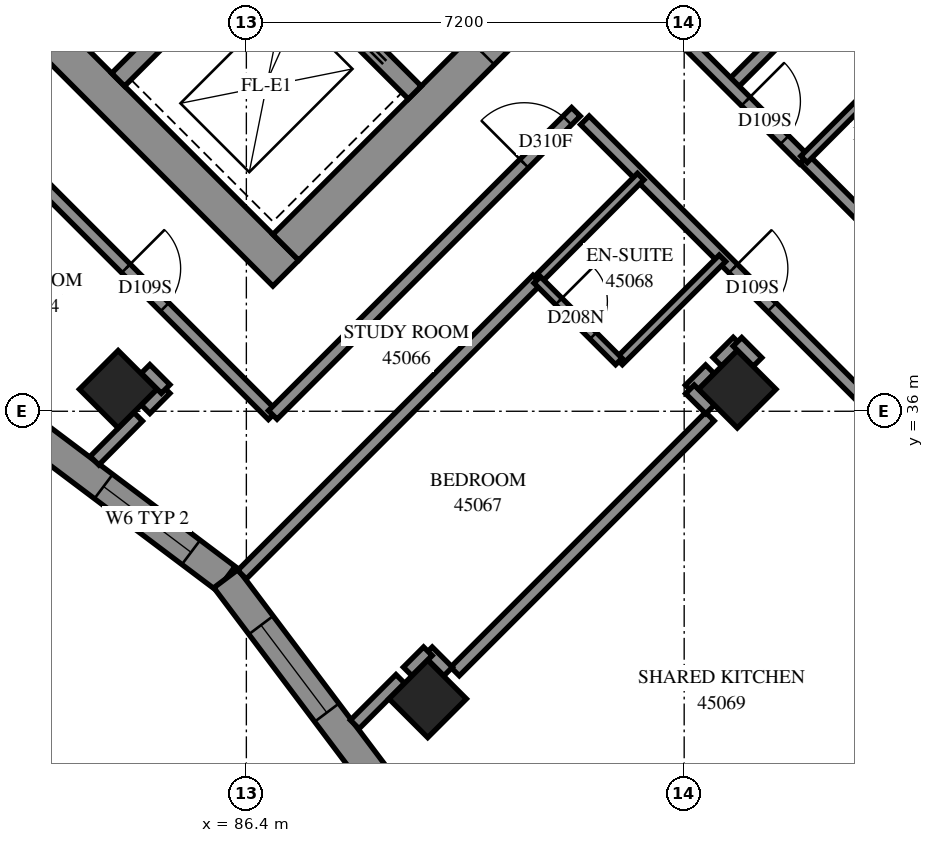
"""IFC4 building model, lengths in metres.
Left out: names, types, materials, properties, quantities, classifications, styles, units other than length and angle.
Written with IfcOpenShell. Run it as: python <this file> out.ifc"""

import sys

from ifc_helpers import new_model, si_unit, direction, frame, frame_2d, origin, origin_2d, place, context, subcontext, project, spatial, polyline, rectangle, outline, extrude, element, fill, save


model = new_model("IFC4")
c1 = context("Model", 3, precision=1e-05, world=origin(), true_north=direction((0.0, 1.0)))
c2 = subcontext(c1, "Body", "Model", "MODEL_VIEW")
j1 = project(units=[si_unit("LENGTHUNIT", "METRE"), si_unit("PLANEANGLEUNIT", "RADIAN")], contexts=[c1])
p1 = place(None, origin())
s1 = spatial("IfcSite", under=j1, at=p1, CompositionType="ELEMENT")
p2 = place(p1, origin())
s2 = spatial("IfcBuilding", under=s1, at=p2, CompositionType="ELEMENT")
p3 = place(p2, frame((0.0, 0.0, 166.0)))
s3 = spatial("IfcBuildingStorey", under=s2, at=p3, CompositionType="ELEMENT", Elevation=166.0)
for number, where, z_axis, x_axis in (
    (1, (84.291, 36.362, 0.0), (0.0, 0.0, 1.0), (0.707, -0.707, 0.0)),
    (2, (94.474, 36.362, 0.0), (0.0, 0.0, 1.0), (0.707, -0.707, 0.0)),
    (3, (89.382, 31.271, 0.0), (0.0, 0.0, 1.0), (0.707, -0.707, 0.0)),
):
    element("IfcColumn", number, at=place(p3, frame(where, z_axis=z_axis, x_axis=x_axis)), inside=s3, PredefinedType="COLUMN", context=c2, shape_type="SweptSolid", body=[
        extrude(rectangle(XDim=0.9, YDim=0.9, at=origin_2d()), origin(), (0.0, 0.0, 1.0), 3.1),
    ])
p4 = place(p3, frame((76.018, 49.302, -0.3), z_axis=(0.0, 0.0, 1.0), x_axis=(0.7071067812, -0.7071067812, 0.0)))
e4 = element("IfcWall", 4, at=p4, inside=s3, PredefinedType="SHEAR", context=c2, shape_type="SweptSolid", body=[
    extrude(rectangle(XDim=15.6, YDim=0.6, at=frame_2d((7.8, 0.0))), origin(), (0.0, 0.0, 1.0), 2.7),
])
p5 = place(p3, frame((87.049, 38.695, -0.3), z_axis=(0.0, 0.0, 1.0), x_axis=(0.7071067812, 0.7071067812, 0.0)))
e5 = element("IfcWall", 5, at=p5, inside=s3, PredefinedType="SHEAR", context=c2, shape_type="SweptSolid", body=[
    extrude(rectangle(XDim=14.4, YDim=0.6, at=frame_2d((7.2, 0.0))), origin(), (0.0, 0.0, 1.0), 2.7),
])
p6 = place(p5, frame((4.55, 0.0, 0.3)))
e6 = element("IfcOpeningElement", 6, at=p6, cuts=e5, PredefinedType="OPENING", context=c2, shape_type="SweptSolid", body=[
    extrude(rectangle(XDim=1.1, YDim=2.1, at=frame_2d((0.55, 1.05))), frame((0.0, 0.31, 0.0), z_axis=(0.0, -1.0, 0.0), x_axis=(1.0, 0.0, 0.0)), (0.0, 0.0, 1.0), 0.62),
])
p7 = place(p5, frame((11.35, 0.0, 0.3)))
e7 = element("IfcOpeningElement", 7, at=p7, cuts=e5, PredefinedType="OPENING", context=c2, shape_type="SweptSolid", body=[
    extrude(rectangle(XDim=1.1, YDim=2.1, at=frame_2d((0.55, 1.05))), frame((0.0, 0.31, 0.0), z_axis=(0.0, -1.0, 0.0), x_axis=(1.0, 0.0, 0.0)), (0.0, 0.0, 1.0), 0.62),
])
p8 = place(p3, frame((84.291, 41.453, 0.0), z_axis=(0.0, 0.0, 1.0), x_axis=(0.7071067812, 0.7071067812, 0.0)))
e8 = element("IfcWall", 8, at=p8, inside=s3, PredefinedType="SOLIDWALL", context=c2, shape_type="SweptSolid", body=[
    extrude(rectangle(XDim=3.3, YDim=0.3, at=frame_2d((1.65, 0.0))), origin(), (0.0, 0.0, 1.0), 3.1),
])
p9 = place(p3, frame((78.988, 51.423, 0.0), z_axis=(0.0, 0.0, 1.0), x_axis=(0.7071067812, -0.7071067812, 0.0)))
e9 = element("IfcWall", 9, at=p9, inside=s3, PredefinedType="SOLIDWALL", context=c2, shape_type="SweptSolid", body=[
    extrude(rectangle(XDim=14.4, YDim=0.3, at=frame_2d((7.2, 0.0))), origin(), (0.0, 0.0, 1.0), 3.1),
])
p10 = place(p9, frame((1.35, 0.0, 0.0)))
e10 = element("IfcOpeningElement", 10, at=p10, cuts=e9, PredefinedType="OPENING", context=c2, shape_type="SweptSolid", body=[
    extrude(rectangle(XDim=0.9, YDim=2.1, at=frame_2d((0.45, 1.05))), frame((0.0, 0.16, 0.0), z_axis=(0.0, -1.0, 0.0), x_axis=(1.0, 0.0, 0.0)), (0.0, 0.0, 1.0), 0.32),
])
p11 = place(p9, frame((4.95, 0.0, 0.0)))
e11 = element("IfcOpeningElement", 11, at=p11, cuts=e9, PredefinedType="OPENING", context=c2, shape_type="SweptSolid", body=[
    extrude(rectangle(XDim=0.9, YDim=2.1, at=frame_2d((0.45, 1.05))), frame((0.0, 0.16, 0.0), z_axis=(0.0, -1.0, 0.0), x_axis=(1.0, 0.0, 0.0)), (0.0, 0.0, 1.0), 0.32),
])
p12 = place(p9, frame((8.55, 0.0, 0.0)))
e12 = element("IfcOpeningElement", 12, at=p12, cuts=e9, PredefinedType="OPENING", context=c2, shape_type="SweptSolid", body=[
    extrude(rectangle(XDim=0.9, YDim=2.1, at=frame_2d((0.45, 1.05))), frame((0.0, 0.16, 0.0), z_axis=(0.0, -1.0, 0.0), x_axis=(1.0, 0.0, 0.0)), (0.0, 0.0, 1.0), 0.32),
])
p13 = place(p9, frame((12.05, 0.0, 0.0)))
e13 = element("IfcOpeningElement", 13, at=p13, cuts=e9, PredefinedType="OPENING", context=c2, shape_type="SweptSolid", body=[
    extrude(rectangle(XDim=1.1, YDim=2.1, at=frame_2d((0.55, 1.05))), frame((0.0, 0.16, 0.0), z_axis=(0.0, -1.0, 0.0), x_axis=(1.0, 0.0, 0.0)), (0.0, 0.0, 1.0), 0.32),
])
p14 = place(p3, frame((82.798, 35.706, 0.0), z_axis=(0.0, 0.0, 1.0), x_axis=(0.7990920997, -0.6012086295, 0.0)))
e14 = element("IfcWall", 14, at=p14, inside=s3, PredefinedType="SOLIDWALL", context=c2, shape_type="SweptSolid", body=[
    extrude(outline(polyline([(-0.035, -0.25), (4.053, -0.25), (4.124, 0.25), (0.035, 0.25), (-0.035, -0.25)])), origin(), (0.0, 0.0, 1.0), 3.1),
])
p15 = place(p14, frame((1.569, 0.0, 0.7)))
e15 = element("IfcOpeningElement", 15, at=p15, cuts=e14, PredefinedType="OPENING", context=c2, shape_type="SweptSolid", body=[
    extrude(rectangle(XDim=1.8, YDim=2.2, at=frame_2d((0.9, 1.1))), frame((0.0, 0.26, 0.0), z_axis=(0.0, -1.0, 0.0), x_axis=(1.0, 0.0, 0.0)), (0.0, 0.0, 1.0), 0.52),
])
p16 = place(p3, frame((86.065, 33.248, 0.0), z_axis=(0.0, 0.0, 1.0), x_axis=(0.6012086295, -0.7990920997, 0.0)))
e16 = element("IfcWall", 16, at=p16, inside=s3, PredefinedType="SOLIDWALL", context=c2, shape_type="SweptSolid", body=[
    extrude(outline(polyline([(0.035, -0.25), (4.124, -0.25), (4.053, 0.25), (-0.035, 0.25), (0.035, -0.25)])), origin(), (0.0, 0.0, 1.0), 3.1),
])
p17 = place(p16, frame((0.958, 0.0, 0.7)))
e17 = element("IfcOpeningElement", 17, at=p17, cuts=e16, PredefinedType="OPENING", context=c2, shape_type="SweptSolid", body=[
    extrude(rectangle(XDim=1.8, YDim=2.2, at=frame_2d((0.9, 1.1))), frame((0.0, 0.26, 0.0), z_axis=(0.0, -1.0, 0.0), x_axis=(1.0, 0.0, 0.0)), (0.0, 0.0, 1.0), 0.52),
])
p18 = place(p3, frame((91.967, 40.785, 0.0), z_axis=(0.0, 0.0, 1.0), x_axis=(0.7071067812, -0.7071067812, 0.0)))
e18 = element("IfcWall", 18, at=p18, inside=s3, PredefinedType="PARTITIONING", context=c2, shape_type="SweptSolid", body=[
    extrude(rectangle(XDim=12.1, YDim=0.2, at=frame_2d((6.05, 0.0))), origin(), (0.0, 0.0, 1.0), 3.1),
])
p19 = place(p18, frame((3.448, 0.0, 0.0)))
e19 = element("IfcOpeningElement", 19, at=p19, cuts=e18, PredefinedType="OPENING", context=c2, shape_type="SweptSolid", body=[
    extrude(rectangle(XDim=0.9, YDim=2.1, at=frame_2d((0.45, 1.05))), frame((0.0, 0.11, 0.0), z_axis=(0.0, -1.0, 0.0), x_axis=(1.0, 0.0, 0.0)), (0.0, 0.0, 1.0), 0.22),
])
p20 = place(p18, frame((8.457, 0.0, 0.0)))
e20 = element("IfcOpeningElement", 20, at=p20, cuts=e18, PredefinedType="OPENING", context=c2, shape_type="SweptSolid", body=[
    extrude(rectangle(XDim=1.0, YDim=2.1, at=frame_2d((0.5, 1.05))), frame((0.0, 0.11, 0.0), z_axis=(0.0, -1.0, 0.0), x_axis=(1.0, 0.0, 0.0)), (0.0, 0.0, 1.0), 0.22),
])
p21 = place(p3, frame((94.366, 41.348, 0.0), z_axis=(0.0, 0.0, 1.0), x_axis=(0.7071108994, 0.707102663, 0.0)))
e21 = element("IfcWall", 21, at=p21, inside=s3, PredefinedType="PARTITIONING", context=c2, shape_type="SweptSolid", body=[
    extrude(rectangle(XDim=12.141, YDim=0.2, at=frame_2d((6.071, 0.0))), origin(), (0.0, 0.0, 1.0), 3.1),
])
p22 = place(p3, frame((80.899, 41.869, 0.0), z_axis=(0.0, 0.0, 1.0), x_axis=(0.7071067812, -0.7071067812, 0.0)))
e22 = element("IfcWall", 22, at=p22, inside=s3, PredefinedType="PARTITIONING", context=c2, shape_type="SweptSolid", body=[
    extrude(rectangle(XDim=8.392, YDim=0.2, at=frame_2d((4.196, 0.0))), origin(), (0.0, 0.0, 1.0), 3.1),
])
p23 = place(p22, frame((4.979, 0.0, 0.0)))
e23 = element("IfcOpeningElement", 23, at=p23, cuts=e22, PredefinedType="OPENING", context=c2, shape_type="SweptSolid", body=[
    extrude(rectangle(XDim=0.9, YDim=2.1, at=frame_2d((0.45, 1.05))), frame((0.0, 0.11, 0.0), z_axis=(0.0, -1.0, 0.0), x_axis=(1.0, 0.0, 0.0)), (0.0, 0.0, 1.0), 0.22),
])
p24 = place(p3, frame((86.834, 35.94, 0.0), z_axis=(0.0, 0.0, 1.0), x_axis=(0.7072486139, 0.7069649201, 0.0)))
e24 = element("IfcWall", 24, at=p24, inside=s3, PredefinedType="PARTITIONING", context=c2, shape_type="SweptSolid", body=[
    extrude(rectangle(XDim=7.05, YDim=0.2, at=frame_2d((3.525, 0.0))), origin(), (0.0, 0.0, 1.0), 3.1),
])
p25 = place(p24, frame((5.848, 0.0, 0.0)))
e25 = element("IfcOpeningElement", 25, at=p25, cuts=e24, PredefinedType="OPENING", context=c2, shape_type="SweptSolid", body=[
    extrude(rectangle(XDim=1.0, YDim=2.1, at=frame_2d((0.5, 1.05))), frame((0.0, 0.11, 0.0), z_axis=(0.0, -1.0, 0.0), x_axis=(1.0, 0.0, 0.0)), (0.0, 0.0, 1.0), 0.22),
])
p26 = place(p3, frame((86.329, 33.313, 0.0), z_axis=(0.0, 0.0, 1.0), x_axis=(0.7072524412, 0.7069610911, 0.0)))
e26 = element("IfcWall", 26, at=p26, inside=s3, PredefinedType="PARTITIONING", context=c2, shape_type="SweptSolid", body=[
    extrude(rectangle(XDim=6.865, YDim=0.2, at=frame_2d((3.432, 0.0))), origin(), (0.0, 0.0, 1.0), 3.1),
])
p27 = place(p3, frame((89.831, 31.721, 0.0), z_axis=(0.0, 0.0, 1.0), x_axis=(0.7071067812, 0.7071067812, 0.0)))
e27 = element("IfcWall", 27, at=p27, inside=s3, PredefinedType="PARTITIONING", context=c2, shape_type="SweptSolid", body=[
    extrude(rectangle(XDim=5.928, YDim=0.2, at=frame_2d((2.964, 0.0))), origin(), (0.0, 0.0, 1.0), 3.1),
])
p28 = place(p3, frame((94.923, 26.631, 0.0), z_axis=(0.0, 0.0, 1.0), x_axis=(0.7071067812, 0.7071067812, 0.0)))
e28 = element("IfcWall", 28, at=p28, inside=s3, PredefinedType="PARTITIONING", context=c2, shape_type="SweptSolid", body=[
    extrude(rectangle(XDim=5.926, YDim=0.2, at=frame_2d((2.963, 0.0))), origin(), (0.0, 0.0, 1.0), 2.6),
])
p29 = place(p3, frame((95.573, 40.148, 0.0), z_axis=(0.0, 0.0, 1.0), x_axis=(0.7068698107, -0.7073436723, 0.0)))
e29 = element("IfcWall", 29, at=p29, inside=s3, PredefinedType="PARTITIONING", context=c2, shape_type="SweptSolid", body=[
    extrude(rectangle(XDim=3.799, YDim=0.2, at=frame_2d((1.899, 0.0))), origin(), (0.0, 0.0, 1.0), 3.1),
])
p30 = place(p3, frame((93.305, 42.403, 0.0), z_axis=(0.0, 0.0, 1.0), x_axis=(0.7071067812, -0.7071067812, 0.0)))
e30 = element("IfcWall", 30, at=p30, inside=s3, PredefinedType="PARTITIONING", context=c2, shape_type="SweptSolid", body=[
    extrude(rectangle(XDim=3.199, YDim=0.2, at=frame_2d((1.599, 0.0))), origin(), (0.0, 0.0, 1.0), 3.1),
])
p31 = place(p30, frame((1.848, 0.0, 0.0)))
e31 = element("IfcOpeningElement", 31, at=p31, cuts=e30, PredefinedType="OPENING", context=c2, shape_type="SweptSolid", body=[
    extrude(rectangle(XDim=0.9, YDim=2.1, at=frame_2d((0.45, 1.05))), frame((0.0, 0.11, 0.0), z_axis=(0.0, -1.0, 0.0), x_axis=(1.0, 0.0, 0.0)), (0.0, 0.0, 1.0), 0.22),
])
for number, where, z_axis, x_axis in (
    (32, (95.571, 40.143, 0.0), (0.0, 0.0, 1.0), (0.707, 0.708, 0.0)),
    (33, (91.189, 38.161, 0.0), (0.0, 0.0, 1.0), (0.707, 0.708, 0.0)),
    (34, (92.531, 36.819, 0.0), (0.0, 0.0, 1.0), (0.708, 0.707, 0.0)),
):
    element("IfcWall", number, at=place(p3, frame(where, z_axis=z_axis, x_axis=x_axis)), inside=s3, PredefinedType="PARTITIONING", context=c2, shape_type="SweptSolid", body=[
        extrude(rectangle(XDim=2.4, YDim=0.15, at=frame_2d((1.2, 0.0))), origin(), (0.0, 0.0, 1.0), 3.1),
    ])
p32 = place(p3, frame((91.183, 38.161, 0.0), z_axis=(0.0, 0.0, 1.0), x_axis=(0.7071067812, -0.7071067812, 0.0)))
e35 = element("IfcWall", 35, at=p32, inside=s3, PredefinedType="PARTITIONING", context=c2, shape_type="SweptSolid", body=[
    extrude(rectangle(XDim=1.898, YDim=0.15, at=frame_2d((0.949, 0.0))), origin(), (0.0, 0.0, 1.0), 3.1),
])
p33 = place(p32, frame((0.501, 0.0, 0.0)))
e36 = element("IfcOpeningElement", 36, at=p33, cuts=e35, PredefinedType="OPENING", context=c2, shape_type="SweptSolid", body=[
    extrude(rectangle(XDim=0.8, YDim=2.1, at=frame_2d((0.4, 1.05))), frame((0.0, 0.085, 0.0), z_axis=(0.0, -1.0, 0.0), x_axis=(1.0, 0.0, 0.0)), (0.0, 0.0, 1.0), 0.17),
])
p34 = place(p3, frame((88.182, 30.85, 0.0), z_axis=(0.0, 0.0, 1.0), x_axis=(0.7071067812, 0.7071067812, 0.0)))
e37 = element("IfcWall", 37, at=p34, inside=s3, PredefinedType="PARTITIONING", context=c2, shape_type="SweptSolid", body=[
    extrude(rectangle(XDim=1.059, YDim=0.2, at=frame_2d((0.53, 0.0))), origin(), (0.0, 0.0, 1.0), 3.1),
])
p35 = place(p3, frame((83.903, 35.188, 0.0), z_axis=(0.0, 0.0, 1.0), x_axis=(0.705188447, 0.7090199251, 0.0)))
e38 = element("IfcWall", 38, at=p35, inside=s3, PredefinedType="PARTITIONING", context=c2, shape_type="SweptSolid", body=[
    extrude(rectangle(XDim=1.018, YDim=0.2, at=frame_2d((0.509, 0.0))), origin(), (0.0, 0.0, 1.0), 3.1),
])
for number, where, z_axis, x_axis in (
    (39, (94.145, 36.813, 0.0), (0.0, 0.0, 1.0), (0.707, 0.707, 0.0)),
    (40, (89.386, 32.052, 0.0), (0.0, 0.0, 1.0), (0.707, -0.707, 0.0)),
    (41, (89.053, 31.721, 0.0), (0.0, 0.0, 1.0), (0.707, 0.707, 0.0)),
    (42, (93.691, 36.359, 0.0), (0.0, 0.0, 1.0), (0.707, 0.707, 0.0)),
):
    element("IfcWall", number, at=place(p3, frame(where, z_axis=z_axis, x_axis=x_axis)), inside=s3, PredefinedType="PARTITIONING", context=c2, shape_type="SweptSolid", body=[
        extrude(rectangle(XDim=0.469, YDim=0.2, at=frame_2d((0.235, 0.0))), origin(), (0.0, 0.0, 1.0), 3.1),
    ])
for number, where, z_axis, x_axis in (
    (43, (94.476, 37.142, 0.0), (0.0, 0.0, 1.0), (0.705, -0.709, 0.0)),
    (44, (84.742, 36.034, 0.0), (0.0, 0.0, 1.0), (0.705, 0.709, 0.0)),
    (45, (93.695, 36.361, 0.0), (0.0, 0.0, 1.0), (0.709, -0.705, 0.0)),
):
    element("IfcWall", number, at=place(p3, frame(where, z_axis=z_axis, x_axis=x_axis)), inside=s3, PredefinedType="PARTITIONING", context=c2, shape_type="SweptSolid", body=[
        extrude(rectangle(XDim=0.468, YDim=0.2, at=frame_2d((0.234, 0.0))), origin(), (0.0, 0.0, 1.0), 3.1),
    ])
p36 = place(p3, frame((84.742, 36.696, 0.0), z_axis=(0.0, 0.0, 1.0), x_axis=(0.7071067812, -0.7071067812, 0.0)))
e46 = element("IfcWall", 46, at=p36, inside=s3, PredefinedType="PARTITIONING", context=c2, shape_type="SweptSolid", body=[
    extrude(rectangle(XDim=0.467, YDim=0.2, at=frame_2d((0.233, 0.0))), origin(), (0.0, 0.0, 1.0), 3.1),
])
p37 = place(p31, origin())
e47 = element("IfcDoor", 47, at=p37, inside=s3, OperationType="SINGLE_SWING_RIGHT", PredefinedType="DOOR", context=c2, shape_type="SweptSolid", body=[
    extrude(rectangle(XDim=0.9, YDim=2.1, at=frame_2d((0.45, 1.05))), frame((0.0, 0.025, 0.0), z_axis=(0.0, -1.0, 0.0), x_axis=(1.0, 0.0, 0.0)), (0.0, 0.0, 1.0), 0.05),
])
fill(e31, e47)
p38 = place(p23, origin())
e48 = element("IfcDoor", 48, at=p38, inside=s3, OperationType="SINGLE_SWING_RIGHT", PredefinedType="DOOR", context=c2, shape_type="SweptSolid", body=[
    extrude(rectangle(XDim=0.9, YDim=2.1, at=frame_2d((0.45, 1.05))), frame((0.0, 0.025, 0.0), z_axis=(0.0, -1.0, 0.0), x_axis=(1.0, 0.0, 0.0)), (0.0, 0.0, 1.0), 0.05),
])
fill(e23, e48)
p39 = place(p25, origin())
e49 = element("IfcDoor", 49, at=p39, inside=s3, OperationType="SINGLE_SWING_RIGHT", PredefinedType="DOOR", context=c2, shape_type="SweptSolid", body=[
    extrude(rectangle(XDim=1.0, YDim=2.1, at=frame_2d((0.5, 1.05))), frame((0.0, 0.025, 0.0), z_axis=(0.0, -1.0, 0.0), x_axis=(1.0, 0.0, 0.0)), (0.0, 0.0, 1.0), 0.05),
])
fill(e25, e49)
p40 = place(p19, origin())
e50 = element("IfcDoor", 50, at=p40, inside=s3, OperationType="SINGLE_SWING_LEFT", PredefinedType="DOOR", context=c2, shape_type="SweptSolid", body=[
    extrude(rectangle(XDim=0.9, YDim=2.1, at=frame_2d((0.45, 1.05))), frame((0.0, 0.025, 0.0), z_axis=(0.0, -1.0, 0.0), x_axis=(1.0, 0.0, 0.0)), (0.0, 0.0, 1.0), 0.05),
])
fill(e19, e50)
p41 = place(p33, origin())
e51 = element("IfcDoor", 51, at=p41, inside=s3, OperationType="SINGLE_SWING_RIGHT", PredefinedType="DOOR", context=c2, shape_type="SweptSolid", body=[
    extrude(rectangle(XDim=0.8, YDim=2.1, at=frame_2d((0.4, 1.05))), frame((0.0, 0.025, 0.0), z_axis=(0.0, -1.0, 0.0), x_axis=(1.0, 0.0, 0.0)), (0.0, 0.0, 1.0), 0.05),
])
fill(e36, e51)
p42 = place(p15, origin())
e52 = element("IfcWindow", 52, at=p42, inside=s3, PartitioningType="SINGLE_PANEL", PredefinedType="WINDOW", context=c2, shape_type="SweptSolid", body=[
    extrude(rectangle(XDim=1.8, YDim=2.2, at=frame_2d((0.9, 1.1))), frame((0.0, 0.18, 0.0), z_axis=(0.0, -1.0, 0.0), x_axis=(1.0, 0.0, 0.0)), (0.0, 0.0, 1.0), 0.06),
])
fill(e15, e52)
p43 = place(p17, origin())
e53 = element("IfcWindow", 53, at=p43, inside=s3, PartitioningType="SINGLE_PANEL", PredefinedType="WINDOW", context=c2, shape_type="SweptSolid", body=[
    extrude(rectangle(XDim=1.8, YDim=2.2, at=frame_2d((0.9, 1.1))), frame((0.0, 0.18, 0.0), z_axis=(0.0, -1.0, 0.0), x_axis=(1.0, 0.0, 0.0)), (0.0, 0.0, 1.0), 0.06),
])
fill(e17, e53)
save(model, sys.argv[1])
